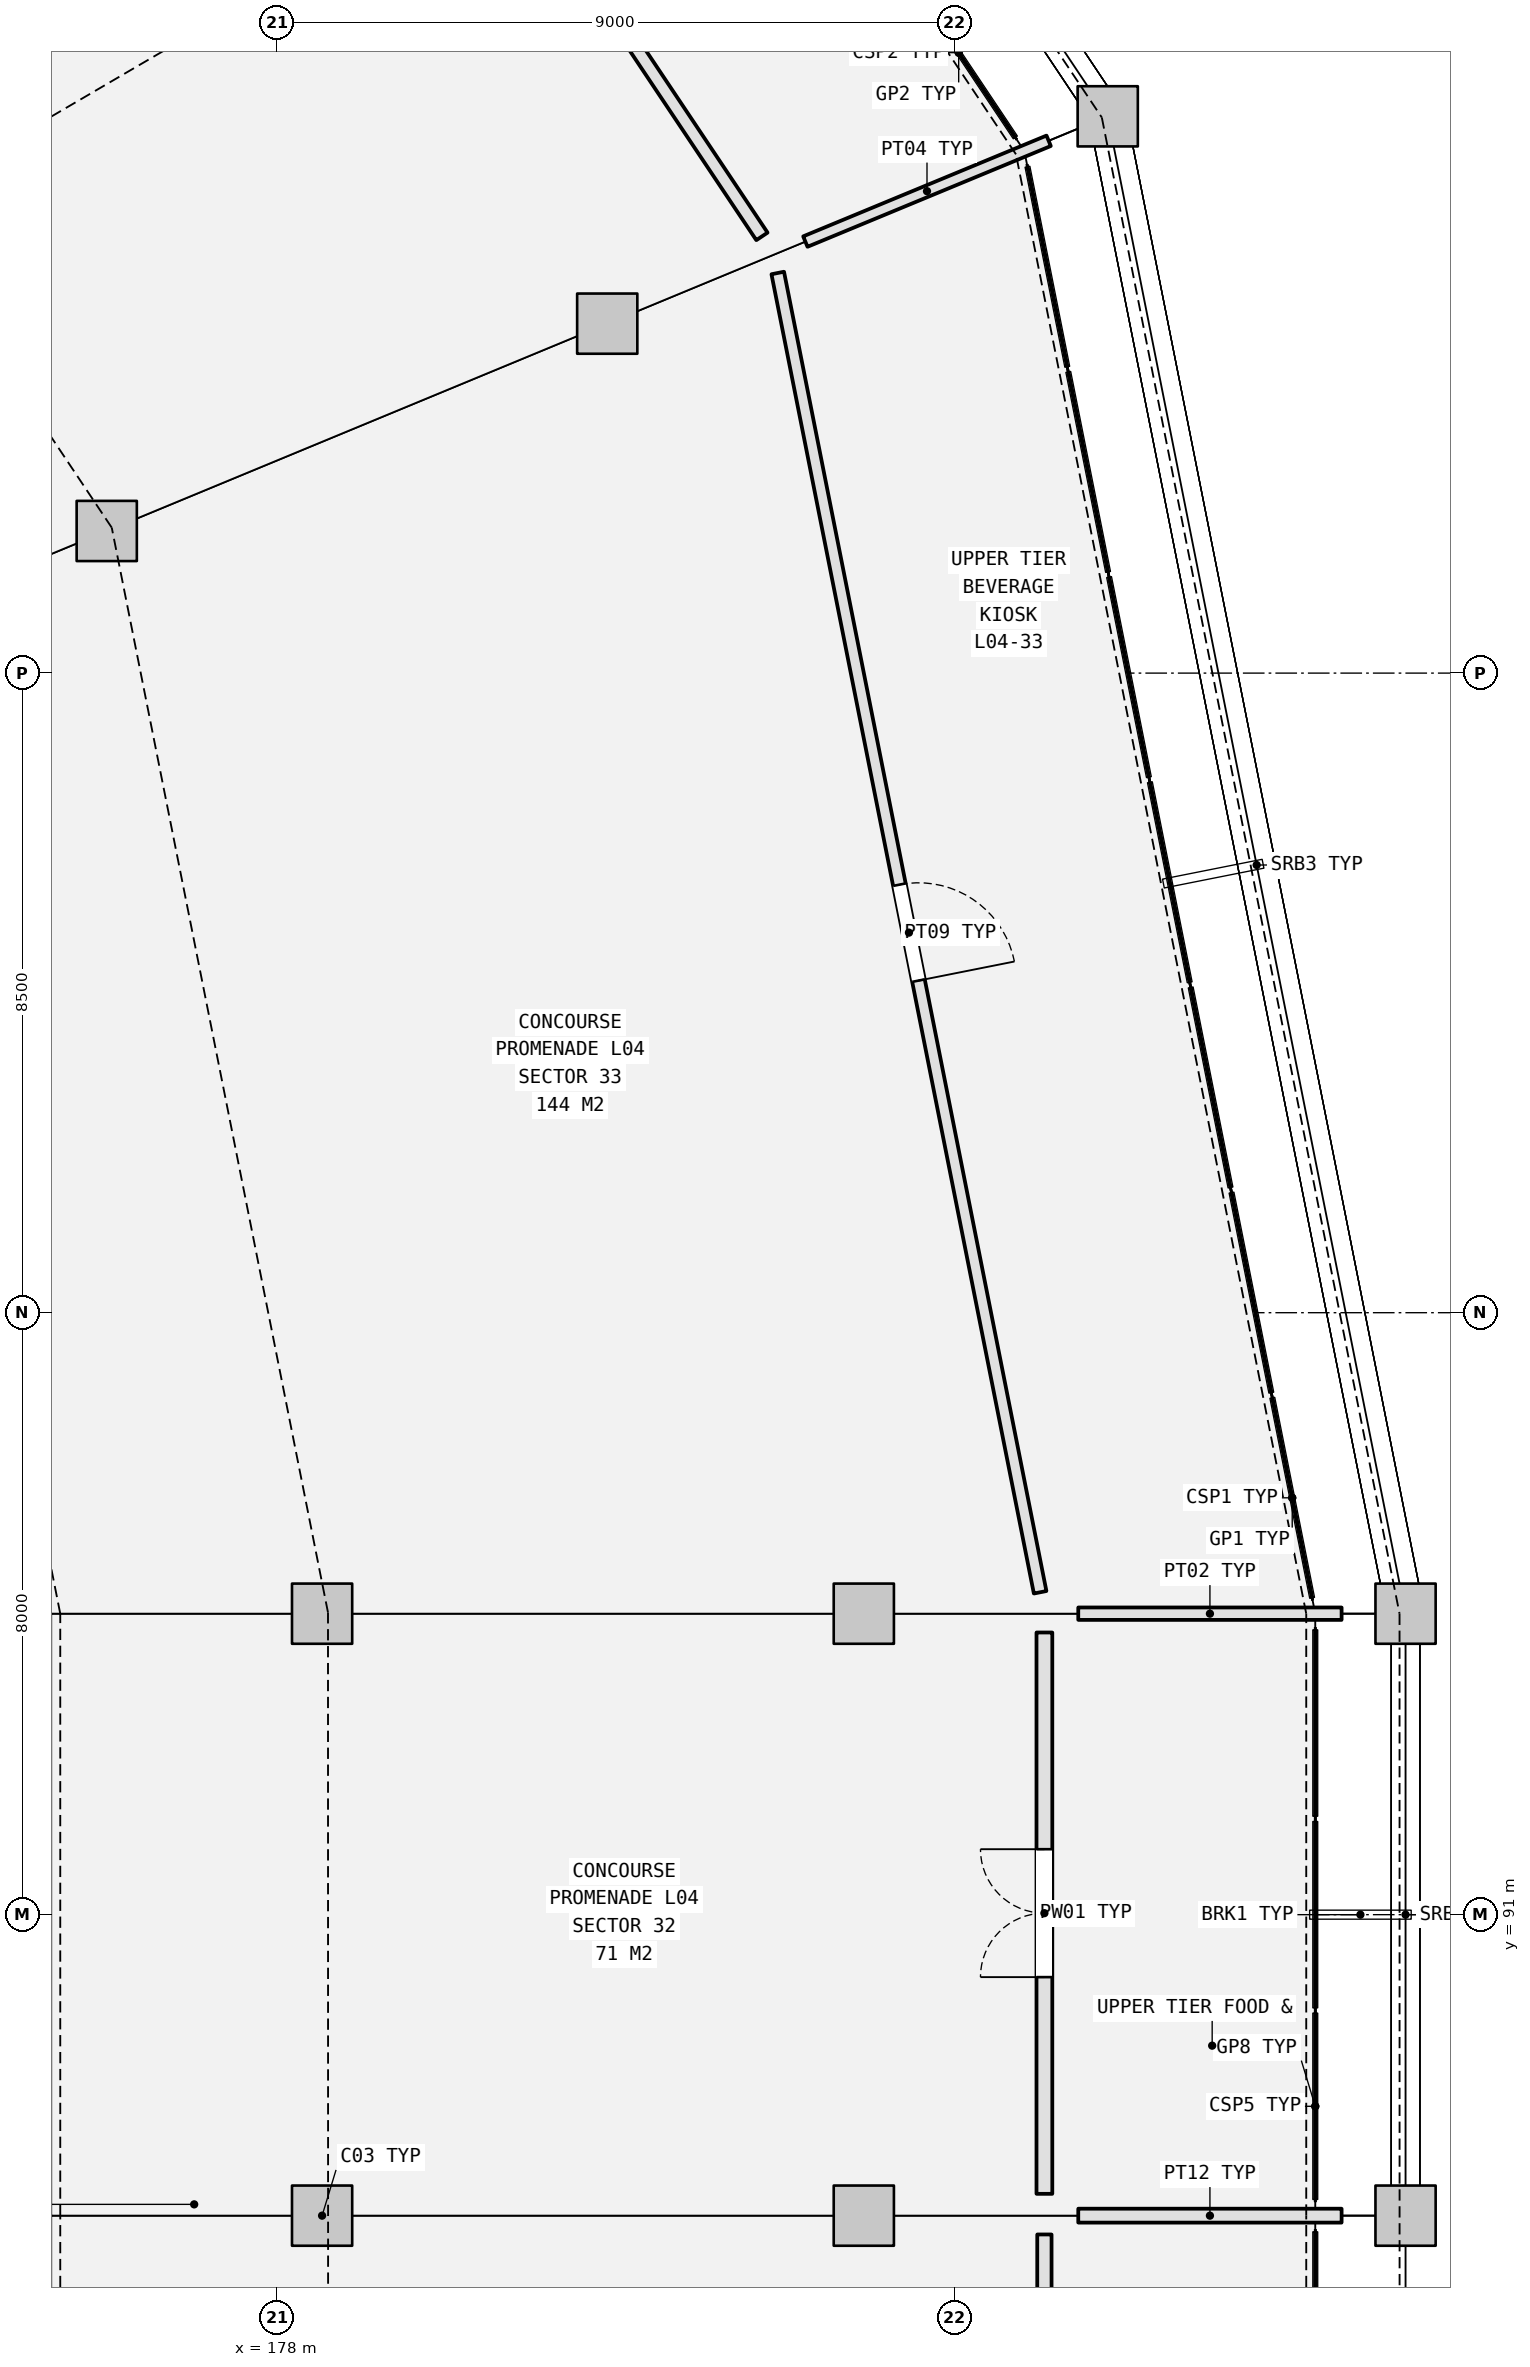
"""IFC4 building model, lengths in metres.
Left out: names, types, materials, properties, quantities, classifications, styles, units other than length and angle.
Written with IfcOpenShell. Run it as: python <this file> out.ifc"""

import sys

from ifc_helpers import new_model, si_unit, direction, frame, frame_2d, origin, origin_2d, place, context, subcontext, project, spatial, rectangle, extrude, element, fill, save


model = new_model("IFC4")
c1 = context("Model", 3, precision=1e-05, world=origin(), true_north=direction((0.0, 1.0)))
c2 = subcontext(c1, "Body", "Model", "MODEL_VIEW")
j1 = project(units=[si_unit("LENGTHUNIT", "METRE"), si_unit("PLANEANGLEUNIT", "RADIAN")], contexts=[c1])
p1 = place(None, origin())
s1 = spatial("IfcSite", under=j1, at=p1, CompositionType="ELEMENT")
p2 = place(p1, origin())
s2 = spatial("IfcBuilding", under=s1, at=p2, CompositionType="ELEMENT")
p3 = place(p2, frame((0.0, 0.0, 21.6)))
s3 = spatial("IfcBuildingStorey", under=s2, at=p3, CompositionType="ELEMENT", Elevation=21.6)
for number, where, z_axis, x_axis in (
    (1, (178.6, 87.0, 0.0), (0.0, 0.0, 1.0), (1.0, 0.0, 0.0)),
    (2, (185.8, 87.0, 0.0), (0.0, 0.0, 1.0), (1.0, 0.0, 0.0)),
    (3, (193.0, 87.0, 0.0), (0.0, 0.0, 1.0), (1.0, 0.0, 0.0)),
    (4, (178.6, 95.0, 0.0), (0.0, 0.0, 1.0), (1.0, 0.0, 0.0)),
    (5, (185.8, 95.0, 0.0), (0.0, 0.0, 1.0), (1.0, 0.0, 0.0)),
    (6, (193.0, 95.0, 0.0), (0.0, 0.0, 1.0), (1.0, 0.0, 0.0)),
    (7, (175.738, 109.389, 0.0), (0.0, 0.0, 1.0), (1.0, 0.0, 0.0)),
    (8, (182.39, 112.144, 0.0), (0.0, 0.0, 1.0), (1.0, 0.0, 0.0)),
    (9, (189.042, 114.9, 0.0), (0.0, 0.0, 1.0), (1.0, 0.0, 0.0)),
):
    element("IfcColumn", number, at=place(p3, frame(where, z_axis=z_axis, x_axis=x_axis)), inside=s3, PredefinedType="COLUMN", context=c2, shape_type="SweptSolid", body=[
        extrude(rectangle(XDim=0.8, YDim=0.8, at=origin_2d()), origin(), (0.0, 0.0, 1.0), 5.4),
    ])
p4 = place(p3, frame((188.2, 79.29, 0.0), z_axis=(0.0, 0.0, 1.0), x_axis=(0.0, 1.0, 0.0)))
e10 = element("IfcWall", 10, at=p4, inside=s3, PredefinedType="PARTITIONING", context=c2, shape_type="SweptSolid", body=[
    extrude(rectangle(XDim=7.46, YDim=0.19, at=frame_2d((3.73, 0.0))), origin(), (0.0, 0.0, 1.0), 2.772),
])
p5 = place(p4, frame((3.28, 0.0, 0.0)))
e11 = element("IfcOpeningElement", 11, at=p5, cuts=e10, PredefinedType="OPENING", context=c2, shape_type="SweptSolid", body=[
    extrude(rectangle(XDim=0.9, YDim=2.1, at=frame_2d((0.45, 1.05))), frame((0.0, 0.105, 0.0), z_axis=(0.0, -1.0, 0.0), x_axis=(1.0, 0.0, 0.0)), (0.0, 0.0, 1.0), 0.21),
])
p6 = place(p3, frame((188.65, 87.0, 0.0), z_axis=(0.0, 0.0, 1.0), x_axis=(1.0, 0.0, 0.0)))
e12 = element("IfcWall", 12, at=p6, inside=s3, PredefinedType="PARTITIONING", context=c2, shape_type="SweptSolid", body=[
    extrude(rectangle(XDim=3.5, YDim=0.185, at=frame_2d((1.75, 0.0))), origin(), (0.0, 0.0, 1.0), 2.772),
])
p7 = place(p3, frame((188.2, 87.29, 0.0), z_axis=(0.0, 0.0, 1.0), x_axis=(0.0, 1.0, 0.0)))
e13 = element("IfcWall", 13, at=p7, inside=s3, PredefinedType="PLUMBINGWALL", context=c2, shape_type="SweptSolid", body=[
    extrude(rectangle(XDim=7.46, YDim=0.21, at=frame_2d((3.73, 0.0))), origin(), (0.0, 0.0, 1.0), 2.772),
])
p8 = place(p7, frame((2.88, 0.0, 0.0)))
e14 = element("IfcOpeningElement", 14, at=p8, cuts=e13, PredefinedType="OPENING", context=c2, shape_type="SweptSolid", body=[
    extrude(rectangle(XDim=1.7, YDim=2.25, at=frame_2d((0.85, 1.125))), frame((0.0, 0.115, 0.0), z_axis=(0.0, -1.0, 0.0), x_axis=(1.0, 0.0, 0.0)), (0.0, 0.0, 1.0), 0.23),
])
p9 = place(p3, frame((188.65, 95.0, 0.0), z_axis=(0.0, 0.0, 1.0), x_axis=(1.0, 0.0, 0.0)))
e15 = element("IfcWall", 15, at=p9, inside=s3, PredefinedType="PARTITIONING", context=c2, shape_type="SweptSolid", body=[
    extrude(rectangle(XDim=3.5, YDim=0.165, at=frame_2d((1.75, 0.0))), origin(), (0.0, 0.0, 1.0), 2.772),
])
p10 = place(p3, frame((188.143, 95.284, 0.0), z_axis=(0.0, 0.0, 1.0), x_axis=(-0.195078607911, 0.980787610411, 0.0)))
e16 = element("IfcWall", 16, at=p10, inside=s3, PredefinedType="PARTITIONING", context=c2, shape_type="SweptSolid", body=[
    extrude(rectangle(XDim=17.876, YDim=0.17, at=frame_2d((8.938, 0.0))), origin(), (0.0, 0.0, 1.0), 2.772),
])
p11 = place(p10, frame((8.288, 0.0, 0.0)))
e17 = element("IfcOpeningElement", 17, at=p11, cuts=e16, PredefinedType="OPENING", context=c2, shape_type="SweptSolid", body=[
    extrude(rectangle(XDim=1.3, YDim=2.2, at=frame_2d((0.65, 1.1))), frame((0.0, 0.095, 0.0), z_axis=(0.0, -1.0, 0.0), x_axis=(1.0, 0.0, 0.0)), (0.0, 0.0, 1.0), 0.19),
])
p12 = place(p3, frame((185.023, 113.235, 0.0), z_axis=(0.0, 0.0, 1.0), x_axis=(0.923896124067, 0.382643374349, 0.0)))
e18 = element("IfcWall", 18, at=p12, inside=s3, PredefinedType="PARTITIONING", context=c2, shape_type="SweptSolid", body=[
    extrude(rectangle(XDim=3.5, YDim=0.15, at=frame_2d((1.75, 0.0))), origin(), (0.0, 0.0, 1.0), 2.772),
])
p13 = place(p3, frame((184.446, 113.304, 0.0), z_axis=(0.0, 0.0, 1.0), x_axis=(-0.55556974362, 0.831469939309, 0.0)))
e19 = element("IfcWall", 19, at=p13, inside=s3, PredefinedType="PARTITIONING", context=c2, shape_type="SweptSolid", body=[
    extrude(rectangle(XDim=17.876, YDim=0.18, at=frame_2d((8.938, 0.0))), origin(), (0.0, 0.0, 1.0), 2.772),
])
p14 = place(p13, frame((8.458, 0.0, 0.0)))
e20 = element("IfcOpeningElement", 20, at=p14, cuts=e19, PredefinedType="OPENING", context=c2, shape_type="SweptSolid", body=[
    extrude(rectangle(XDim=0.96, YDim=2.15, at=frame_2d((0.48, 1.075))), frame((0.0, 0.1, 0.0), z_axis=(0.0, -1.0, 0.0), x_axis=(1.0, 0.0, 0.0)), (0.0, 0.0, 1.0), 0.2),
])
p15 = place(p8, origin())
e21 = element("IfcDoor", 21, at=p15, inside=s3, OperationType="DOUBLE_DOOR_SINGLE_SWING", PredefinedType="DOOR", context=c2, shape_type="SweptSolid", body=[
    extrude(rectangle(XDim=1.7, YDim=2.25, at=frame_2d((0.85, 1.125))), frame((0.0, 0.025, 0.0), z_axis=(0.0, -1.0, 0.0), x_axis=(1.0, 0.0, 0.0)), (0.0, 0.0, 1.0), 0.05),
])
fill(e14, e21)
p16 = place(p11, frame((1.3, 0.0, 0.0), z_axis=(0.0, 0.0, 1.0), x_axis=(-1.0, 0.0, 0.0)))
e22 = element("IfcDoor", 22, at=p16, inside=s3, OperationType="SINGLE_SWING_LEFT", PredefinedType="DOOR", context=c2, shape_type="SweptSolid", body=[
    extrude(rectangle(XDim=1.3, YDim=2.2, at=frame_2d((0.65, 1.1))), frame((0.0, 0.025, 0.0), z_axis=(0.0, -1.0, 0.0), x_axis=(1.0, 0.0, 0.0)), (0.0, 0.0, 1.0), 0.05),
])
fill(e17, e22)
save(model, sys.argv[1])
